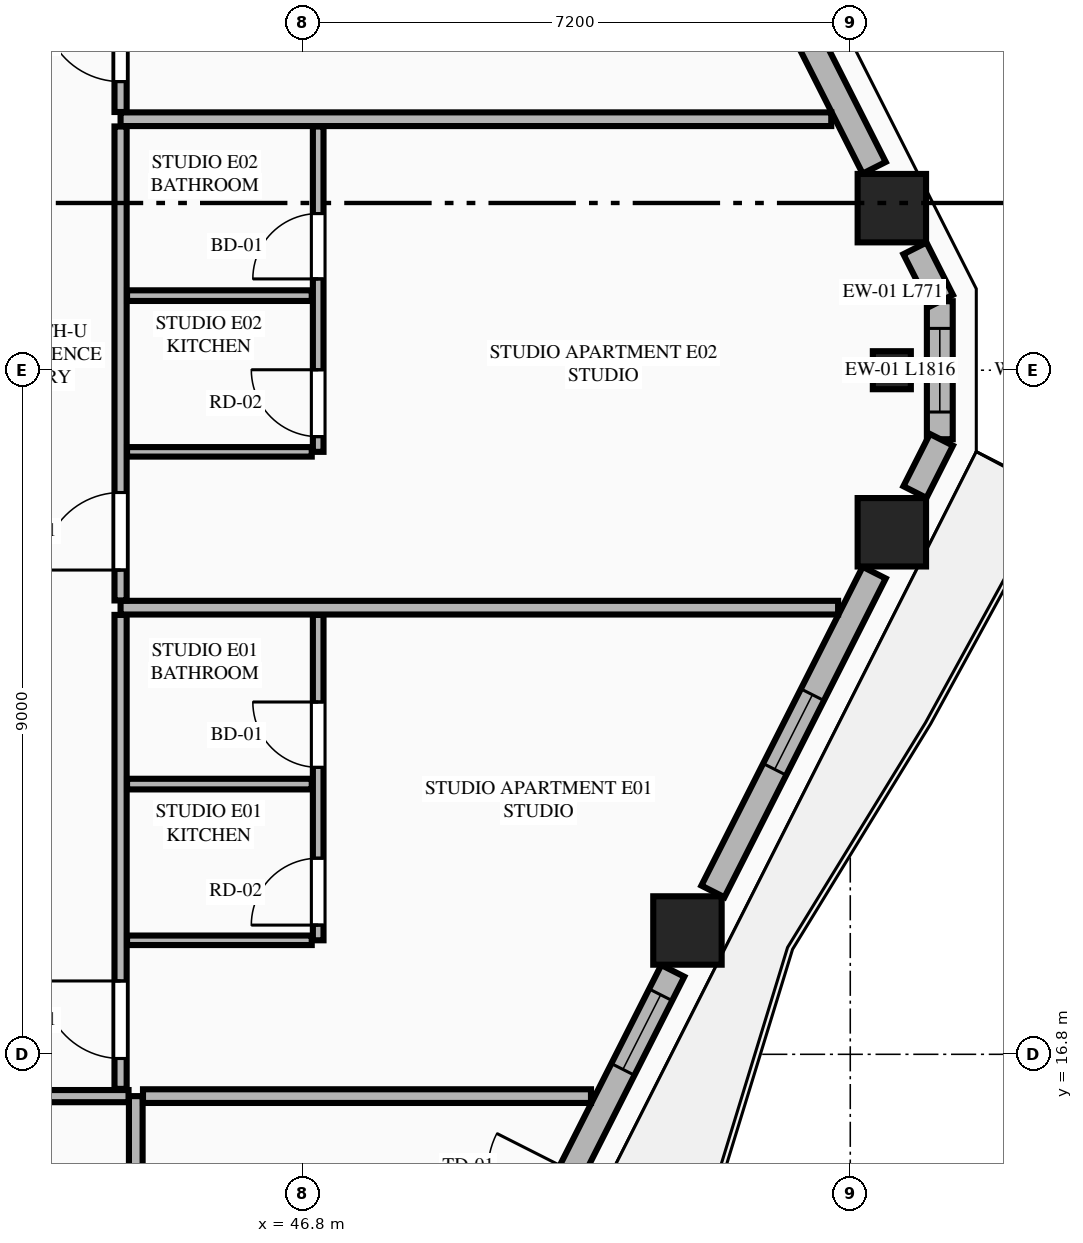
"""IFC4 building model, lengths in metres.
Left out: names, types, materials, properties, quantities, classifications, styles, units other than length and angle.
Written with IfcOpenShell. Run it as: python <this file> out.ifc"""

import sys

from ifc_helpers import new_model, si_unit, direction, frame, frame_2d, origin, origin_2d, place, context, subcontext, project, spatial, rectangle, extrude, element, fill, save


model = new_model("IFC4")
c1 = context("Model", 3, precision=1e-05, world=origin(), true_north=direction((0.0, 1.0)))
c2 = subcontext(c1, "Body", "Model", "MODEL_VIEW")
j1 = project(units=[si_unit("LENGTHUNIT", "METRE"), si_unit("PLANEANGLEUNIT", "RADIAN")], contexts=[c1])
p1 = place(None, origin())
s1 = spatial("IfcSite", under=j1, at=p1, CompositionType="ELEMENT")
p2 = place(p1, origin())
s2 = spatial("IfcBuilding", under=s1, at=p2, CompositionType="ELEMENT")
p3 = place(p2, frame((0.0, 0.0, 186.1)))
s3 = spatial("IfcBuildingStorey", under=s2, at=p3, CompositionType="ELEMENT", Elevation=186.1)
for number, where, z_axis, x_axis in (
    (1, (51.858, 18.429, 0.0), (0.0, 0.0, 1.0), (1.0, 0.0, 0.0)),
    (2, (54.547, 23.668, 0.0), (0.0, 0.0, 1.0), (1.0, 0.0, 0.0)),
    (3, (54.547, 27.932, 0.0), (0.0, 0.0, 1.0), (1.0, 0.0, 0.0)),
):
    element("IfcColumn", number, at=place(p3, frame(where, z_axis=z_axis, x_axis=x_axis)), inside=s3, PredefinedType="COLUMN", context=c2, shape_type="SweptSolid", body=[
        extrude(rectangle(XDim=0.9, YDim=0.9, at=origin_2d()), origin(), (0.0, 0.0, 1.0), 3.55),
    ])
p4 = place(p3, frame((54.547, 25.8, 0.0), z_axis=(0.0, 0.0, 1.0), x_axis=(0.0, 1.0, 0.0)))
e4 = element("IfcColumn", 4, at=p4, inside=s3, PredefinedType="PILASTER", context=c2, shape_type="SweptSolid", body=[
    extrude(rectangle(XDim=0.5, YDim=0.35, at=origin_2d()), origin(), (0.0, 0.0, 1.0), 3.55),
])
p5 = place(p3, frame((55.178, 24.892, 0.0), z_axis=(0.0, 0.0, 1.0), x_axis=(0.0, 1.0, 0.0)))
e5 = element("IfcWall", 5, at=p5, inside=s3, PredefinedType="STANDARD", context=c2, shape_type="SweptSolid", body=[
    extrude(rectangle(XDim=1.816, YDim=0.34, at=frame_2d((0.908, 0.0))), origin(), (0.0, 0.0, 1.0), 3.35),
])
p6 = place(p5, frame((0.358, 0.0, 0.75)))
e6 = element("IfcOpeningElement", 6, at=p6, cuts=e5, PredefinedType="OPENING", context=c2, shape_type="SweptSolid", body=[
    extrude(rectangle(XDim=1.1, YDim=2.0, at=frame_2d((0.55, 1.0))), frame((0.0, 0.18, 0.0), z_axis=(0.0, -1.0, 0.0), x_axis=(1.0, 0.0, 0.0)), (0.0, 0.0, 1.0), 0.36),
])
p7 = place(p3, frame((49.448, 13.517, 0.0), z_axis=(0.0, 0.0, 1.0), x_axis=(0.451544279509, 0.892248711763, 0.0)))
e7 = element("IfcWall", 7, at=p7, inside=s3, PredefinedType="STANDARD", context=c2, shape_type="SweptSolid", body=[
    extrude(rectangle(XDim=4.91, YDim=0.34, at=frame_2d((2.455, 0.0))), origin(), (0.0, 0.0, 1.0), 2.883),
])
p8 = place(p7, frame((0.856, 0.0, 0.0)))
e8 = element("IfcOpeningElement", 8, at=p8, cuts=e7, PredefinedType="OPENING", context=c2, shape_type="SweptSolid", body=[
    extrude(rectangle(XDim=1.1, YDim=2.25, at=frame_2d((0.55, 1.125))), frame((0.0, 0.18, 0.0), z_axis=(0.0, -1.0, 0.0), x_axis=(1.0, 0.0, 0.0)), (0.0, 0.0, 1.0), 0.36),
])
p9 = place(p7, frame((3.457, 0.0, 0.75)))
e9 = element("IfcOpeningElement", 9, at=p9, cuts=e7, PredefinedType="OPENING", context=c2, shape_type="SweptSolid", body=[
    extrude(rectangle(XDim=1.1, YDim=1.983, at=frame_2d((0.55, 0.991))), frame((0.0, 0.18, 0.0), z_axis=(0.0, -1.0, 0.0), x_axis=(1.0, 0.0, 0.0)), (0.0, 0.0, 1.0), 0.36),
])
p10 = place(p3, frame((52.193, 18.943, 0.0), z_axis=(0.0, 0.0, 1.0), x_axis=(0.451447222193, 0.892297823361, 0.0)))
e10 = element("IfcWall", 10, at=p10, inside=s3, PredefinedType="STANDARD", context=c2, shape_type="SweptSolid", body=[
    extrude(rectangle(XDim=4.7, YDim=0.34, at=frame_2d((2.35, 0.0))), origin(), (0.0, 0.0, 1.0), 2.883),
])
p11 = place(p10, frame((1.8, 0.0, 0.75)))
e11 = element("IfcOpeningElement", 11, at=p11, cuts=e10, PredefinedType="OPENING", context=c2, shape_type="SweptSolid", body=[
    extrude(rectangle(XDim=1.1, YDim=1.983, at=frame_2d((0.55, 0.991))), frame((0.0, 0.18, 0.0), z_axis=(0.0, -1.0, 0.0), x_axis=(1.0, 0.0, 0.0)), (0.0, 0.0, 1.0), 0.36),
])
for number, where, z_axis, x_axis in (
    (12, (54.851, 24.197, 0.0), (0.0, 0.0, 1.0), (0.451, 0.892, 0.0)),
    (13, (55.199, 26.715, 0.0), (0.0, 0.0, 1.0), (-0.451, 0.892, 0.0)),
):
    element("IfcWall", number, at=place(p3, frame(where, z_axis=z_axis, x_axis=x_axis)), inside=s3, PredefinedType="STANDARD", context=c2, shape_type="SweptSolid", body=[
        extrude(rectangle(XDim=0.771, YDim=0.34, at=frame_2d((0.385, 0.0))), origin(), (0.0, 0.0, 1.0), 3.35),
    ])
p12 = place(p3, frame((54.315, 28.463, 0.0), z_axis=(0.0, 0.0, 1.0), x_axis=(-0.451426298588, 0.892308409096, 0.0)))
e14 = element("IfcWall", 14, at=p12, inside=s3, PredefinedType="STANDARD", context=c2, shape_type="SweptSolid", body=[
    extrude(rectangle(XDim=4.7, YDim=0.34, at=frame_2d((2.35, 0.0))), origin(), (0.0, 0.0, 1.0), 2.883),
])
p13 = place(p12, frame((1.8, 0.0, 0.75)))
e15 = element("IfcOpeningElement", 15, at=p13, cuts=e14, PredefinedType="OPENING", context=c2, shape_type="SweptSolid", body=[
    extrude(rectangle(XDim=1.1, YDim=1.983, at=frame_2d((0.55, 0.991))), frame((0.0, 0.18, 0.0), z_axis=(0.0, -1.0, 0.0), x_axis=(1.0, 0.0, 0.0)), (0.0, 0.0, 1.0), 0.36),
])
p14 = place(p3, frame((44.6, 5.968, 0.0), z_axis=(0.0, 0.0, 1.0), x_axis=(0.0, 1.0, 0.0)))
e16 = element("IfcWall", 16, at=p14, inside=s3, PredefinedType="PARTITIONING", context=c2, shape_type="SweptSolid", body=[
    extrude(rectangle(XDim=10.282, YDim=0.18, at=frame_2d((5.141, 0.0))), origin(), (0.0, 0.0, 1.0), 3.35),
])
p15 = place(p3, frame((36.038, 16.25, 0.0), z_axis=(0.0, 0.0, 1.0), x_axis=(1.0, 0.0, 0.0)))
e17 = element("IfcWall", 17, at=p15, inside=s3, PredefinedType="PARTITIONING", context=c2, shape_type="SweptSolid", body=[
    extrude(rectangle(XDim=8.467, YDim=0.16, at=frame_2d((4.233, 0.0))), origin(), (0.0, 0.0, 1.0), 3.35),
])
p16 = place(p15, frame((0.355, 0.0, 0.0)))
e18 = element("IfcOpeningElement", 18, at=p16, cuts=e17, PredefinedType="OPENING", context=c2, shape_type="SweptSolid", body=[
    extrude(rectangle(XDim=1.02, YDim=2.25, at=frame_2d((0.51, 1.125))), frame((0.0, 0.09, 0.0), z_axis=(0.0, -1.0, 0.0), x_axis=(1.0, 0.0, 0.0)), (0.0, 0.0, 1.0), 0.18),
])
p17 = place(p3, frame((44.695, 16.25, 0.0), z_axis=(0.0, 0.0, 1.0), x_axis=(1.0, 0.0, 0.0)))
e19 = element("IfcWall", 19, at=p17, inside=s3, PredefinedType="PARTITIONING", context=c2, shape_type="SweptSolid", body=[
    extrude(rectangle(XDim=5.894, YDim=0.18, at=frame_2d((2.947, 0.0))), origin(), (0.0, 0.0, 1.0), 3.35),
])
p18 = place(p3, frame((44.4, 16.345, 0.0), z_axis=(0.0, 0.0, 1.0), x_axis=(0.0, 1.0, 0.0)))
e20 = element("IfcWall", 20, at=p18, inside=s3, PredefinedType="PARTITIONING", context=c2, shape_type="SweptSolid", body=[
    extrude(rectangle(XDim=6.236, YDim=0.16, at=frame_2d((3.118, 0.0))), origin(), (0.0, 0.0, 1.0), 3.35),
])
p19 = place(p18, frame((0.4, 0.0, 0.0)))
e21 = element("IfcOpeningElement", 21, at=p19, cuts=e20, PredefinedType="OPENING", context=c2, shape_type="SweptSolid", body=[
    extrude(rectangle(XDim=1.02, YDim=2.25, at=frame_2d((0.51, 1.125))), frame((0.0, 0.09, 0.0), z_axis=(0.0, -1.0, 0.0), x_axis=(1.0, 0.0, 0.0)), (0.0, 0.0, 1.0), 0.18),
])
p20 = place(p3, frame((44.485, 18.3, 0.0), z_axis=(0.0, 0.0, 1.0), x_axis=(1.0, 0.0, 0.0)))
e22 = element("IfcWall", 22, at=p20, inside=s3, PredefinedType="PARTITIONING", context=c2, shape_type="SweptSolid", body=[
    extrude(rectangle(XDim=2.43, YDim=0.125, at=frame_2d((1.215, 0.0))), origin(), (0.0, 0.0, 1.0), 2.807),
])
p21 = place(p3, frame((47.0, 18.3, 0.0), z_axis=(0.0, 0.0, 1.0), x_axis=(0.0, 1.0, 0.0)))
e23 = element("IfcWall", 23, at=p21, inside=s3, PredefinedType="PLUMBINGWALL", context=c2, shape_type="SweptSolid", body=[
    extrude(rectangle(XDim=4.281, YDim=0.14, at=frame_2d((2.141, 0.0))), origin(), (0.0, 0.0, 1.0), 3.35),
])
p22 = place(p21, frame((2.275, 0.0, 0.0)))
e24 = element("IfcOpeningElement", 24, at=p22, cuts=e23, PredefinedType="OPENING", context=c2, shape_type="SweptSolid", body=[
    extrude(rectangle(XDim=0.86, YDim=2.1, at=frame_2d((0.43, 1.05))), frame((0.0, 0.08, 0.0), z_axis=(0.0, -1.0, 0.0), x_axis=(1.0, 0.0, 0.0)), (0.0, 0.0, 1.0), 0.16),
])
p23 = place(p21, frame((0.2, 0.0, 0.0)))
e25 = element("IfcOpeningElement", 25, at=p23, cuts=e23, PredefinedType="OPENING", context=c2, shape_type="SweptSolid", body=[
    extrude(rectangle(XDim=0.88, YDim=2.15, at=frame_2d((0.44, 1.075))), frame((0.0, 0.08, 0.0), z_axis=(0.0, -1.0, 0.0), x_axis=(1.0, 0.0, 0.0)), (0.0, 0.0, 1.0), 0.16),
])
p24 = place(p3, frame((44.485, 20.355, 0.0), z_axis=(0.0, 0.0, 1.0), x_axis=(1.0, 0.0, 0.0)))
e26 = element("IfcWall", 26, at=p24, inside=s3, PredefinedType="PLUMBINGWALL", context=c2, shape_type="SweptSolid", body=[
    extrude(rectangle(XDim=2.43, YDim=0.14, at=frame_2d((1.215, 0.0))), origin(), (0.0, 0.0, 1.0), 3.35),
])
p25 = place(p3, frame((44.4, 22.676, 0.0), z_axis=(0.0, 0.0, 1.0), x_axis=(1.0, 0.0, 0.0)))
e27 = element("IfcWall", 27, at=p25, inside=s3, PredefinedType="PARTITIONING", context=c2, shape_type="SweptSolid", body=[
    extrude(rectangle(XDim=9.44, YDim=0.18, at=frame_2d((4.72, 0.0))), origin(), (0.0, 0.0, 1.0), 3.35),
])
p26 = place(p3, frame((44.4, 22.771, 0.0), z_axis=(0.0, 0.0, 1.0), x_axis=(0.0, 1.0, 0.0)))
e28 = element("IfcWall", 28, at=p26, inside=s3, PredefinedType="PARTITIONING", context=c2, shape_type="SweptSolid", body=[
    extrude(rectangle(XDim=6.236, YDim=0.16, at=frame_2d((3.118, 0.0))), origin(), (0.0, 0.0, 1.0), 3.35),
])
p27 = place(p26, frame((0.4, 0.0, 0.0)))
e29 = element("IfcOpeningElement", 29, at=p27, cuts=e28, PredefinedType="OPENING", context=c2, shape_type="SweptSolid", body=[
    extrude(rectangle(XDim=1.02, YDim=2.25, at=frame_2d((0.51, 1.125))), frame((0.0, 0.09, 0.0), z_axis=(0.0, -1.0, 0.0), x_axis=(1.0, 0.0, 0.0)), (0.0, 0.0, 1.0), 0.18),
])
p28 = place(p3, frame((44.485, 24.726, 0.0), z_axis=(0.0, 0.0, 1.0), x_axis=(1.0, 0.0, 0.0)))
e30 = element("IfcWall", 30, at=p28, inside=s3, PredefinedType="PARTITIONING", context=c2, shape_type="SweptSolid", body=[
    extrude(rectangle(XDim=2.43, YDim=0.125, at=frame_2d((1.215, 0.0))), origin(), (0.0, 0.0, 1.0), 3.35),
])
p29 = place(p3, frame((47.0, 24.726, 0.0), z_axis=(0.0, 0.0, 1.0), x_axis=(0.0, 1.0, 0.0)))
e31 = element("IfcWall", 31, at=p29, inside=s3, PredefinedType="PLUMBINGWALL", context=c2, shape_type="SweptSolid", body=[
    extrude(rectangle(XDim=4.281, YDim=0.14, at=frame_2d((2.141, 0.0))), origin(), (0.0, 0.0, 1.0), 3.35),
])
p30 = place(p29, frame((2.275, 0.0, 0.0)))
e32 = element("IfcOpeningElement", 32, at=p30, cuts=e31, PredefinedType="OPENING", context=c2, shape_type="SweptSolid", body=[
    extrude(rectangle(XDim=0.86, YDim=2.1, at=frame_2d((0.43, 1.05))), frame((0.0, 0.08, 0.0), z_axis=(0.0, -1.0, 0.0), x_axis=(1.0, 0.0, 0.0)), (0.0, 0.0, 1.0), 0.16),
])
p31 = place(p29, frame((0.2, 0.0, 0.0)))
e33 = element("IfcOpeningElement", 33, at=p31, cuts=e31, PredefinedType="OPENING", context=c2, shape_type="SweptSolid", body=[
    extrude(rectangle(XDim=0.88, YDim=2.15, at=frame_2d((0.44, 1.075))), frame((0.0, 0.08, 0.0), z_axis=(0.0, -1.0, 0.0), x_axis=(1.0, 0.0, 0.0)), (0.0, 0.0, 1.0), 0.16),
])
p32 = place(p3, frame((44.485, 26.781, 0.0), z_axis=(0.0, 0.0, 1.0), x_axis=(1.0, 0.0, 0.0)))
e34 = element("IfcWall", 34, at=p32, inside=s3, PredefinedType="PLUMBINGWALL", context=c2, shape_type="SweptSolid", body=[
    extrude(rectangle(XDim=2.43, YDim=0.14, at=frame_2d((1.215, 0.0))), origin(), (0.0, 0.0, 1.0), 3.35),
])
p33 = place(p3, frame((44.4, 29.102, 0.0), z_axis=(0.0, 0.0, 1.0), x_axis=(1.0, 0.0, 0.0)))
e35 = element("IfcWall", 35, at=p33, inside=s3, PredefinedType="PARTITIONING", context=c2, shape_type="SweptSolid", body=[
    extrude(rectangle(XDim=9.35, YDim=0.18, at=frame_2d((4.675, 0.0))), origin(), (0.0, 0.0, 1.0), 3.35),
])
p34 = place(p3, frame((44.4, 29.197, 0.0), z_axis=(0.0, 0.0, 1.0), x_axis=(0.0, 1.0, 0.0)))
e36 = element("IfcWall", 36, at=p34, inside=s3, PredefinedType="PARTITIONING", context=c2, shape_type="SweptSolid", body=[
    extrude(rectangle(XDim=5.858, YDim=0.16, at=frame_2d((2.929, 0.0))), origin(), (0.0, 0.0, 1.0), 3.35),
])
p35 = place(p34, frame((0.4, 0.0, 0.0)))
e37 = element("IfcOpeningElement", 37, at=p35, cuts=e36, PredefinedType="OPENING", context=c2, shape_type="SweptSolid", body=[
    extrude(rectangle(XDim=1.02, YDim=2.25, at=frame_2d((0.51, 1.125))), frame((0.0, 0.09, 0.0), z_axis=(0.0, -1.0, 0.0), x_axis=(1.0, 0.0, 0.0)), (0.0, 0.0, 1.0), 0.18),
])
p36 = place(p11, origin())
e38 = element("IfcWindow", 38, at=p36, inside=s3, PartitioningType="SINGLE_PANEL", PredefinedType="WINDOW", context=c2, shape_type="SweptSolid", body=[
    extrude(rectangle(XDim=1.1, YDim=1.983, at=frame_2d((0.55, 0.991))), frame((0.0, 0.03, 0.0), z_axis=(0.0, -1.0, 0.0), x_axis=(1.0, 0.0, 0.0)), (0.0, 0.0, 1.0), 0.06),
])
fill(e11, e38)
p37 = place(p22, origin())
e39 = element("IfcDoor", 39, at=p37, inside=s3, OperationType="SINGLE_SWING_RIGHT", PredefinedType="DOOR", context=c2, shape_type="SweptSolid", body=[
    extrude(rectangle(XDim=0.86, YDim=2.1, at=frame_2d((0.43, 1.05))), frame((0.0, 0.025, 0.0), z_axis=(0.0, -1.0, 0.0), x_axis=(1.0, 0.0, 0.0)), (0.0, 0.0, 1.0), 0.05),
])
fill(e24, e39)
p38 = place(p19, origin())
e40 = element("IfcDoor", 40, at=p38, inside=s3, OperationType="SINGLE_SWING_RIGHT", PredefinedType="DOOR", context=c2, shape_type="SweptSolid", body=[
    extrude(rectangle(XDim=1.02, YDim=2.25, at=frame_2d((0.51, 1.125))), frame((0.0, 0.025, 0.0), z_axis=(0.0, -1.0, 0.0), x_axis=(1.0, 0.0, 0.0)), (0.0, 0.0, 1.0), 0.05),
])
fill(e21, e40)
p39 = place(p23, origin())
e41 = element("IfcDoor", 41, at=p39, inside=s3, OperationType="SINGLE_SWING_LEFT", PredefinedType="DOOR", context=c2, shape_type="SweptSolid", body=[
    extrude(rectangle(XDim=0.88, YDim=2.15, at=frame_2d((0.44, 1.075))), frame((0.0, 0.025, 0.0), z_axis=(0.0, -1.0, 0.0), x_axis=(1.0, 0.0, 0.0)), (0.0, 0.0, 1.0), 0.05),
])
fill(e25, e41)
p40 = place(p30, origin())
e42 = element("IfcDoor", 42, at=p40, inside=s3, OperationType="SINGLE_SWING_LEFT", PredefinedType="DOOR", context=c2, shape_type="SweptSolid", body=[
    extrude(rectangle(XDim=0.86, YDim=2.1, at=frame_2d((0.43, 1.05))), frame((0.0, 0.025, 0.0), z_axis=(0.0, -1.0, 0.0), x_axis=(1.0, 0.0, 0.0)), (0.0, 0.0, 1.0), 0.05),
])
fill(e32, e42)
p41 = place(p27, origin())
e43 = element("IfcDoor", 43, at=p41, inside=s3, OperationType="SINGLE_SWING_LEFT", PredefinedType="DOOR", context=c2, shape_type="SweptSolid", body=[
    extrude(rectangle(XDim=1.02, YDim=2.25, at=frame_2d((0.51, 1.125))), frame((0.0, 0.025, 0.0), z_axis=(0.0, -1.0, 0.0), x_axis=(1.0, 0.0, 0.0)), (0.0, 0.0, 1.0), 0.05),
])
fill(e29, e43)
p42 = place(p31, origin())
e44 = element("IfcDoor", 44, at=p42, inside=s3, OperationType="SINGLE_SWING_RIGHT", PredefinedType="DOOR", context=c2, shape_type="SweptSolid", body=[
    extrude(rectangle(XDim=0.88, YDim=2.15, at=frame_2d((0.44, 1.075))), frame((0.0, 0.025, 0.0), z_axis=(0.0, -1.0, 0.0), x_axis=(1.0, 0.0, 0.0)), (0.0, 0.0, 1.0), 0.05),
])
fill(e33, e44)
p43 = place(p35, origin())
e45 = element("IfcDoor", 45, at=p43, inside=s3, OperationType="SINGLE_SWING_RIGHT", PredefinedType="DOOR", context=c2, shape_type="SweptSolid", body=[
    extrude(rectangle(XDim=1.02, YDim=2.25, at=frame_2d((0.51, 1.125))), frame((0.0, 0.025, 0.0), z_axis=(0.0, -1.0, 0.0), x_axis=(1.0, 0.0, 0.0)), (0.0, 0.0, 1.0), 0.05),
])
fill(e37, e45)
p44 = place(p9, origin())
e46 = element("IfcWindow", 46, at=p44, inside=s3, PartitioningType="SINGLE_PANEL", PredefinedType="WINDOW", context=c2, shape_type="SweptSolid", body=[
    extrude(rectangle(XDim=1.1, YDim=1.983, at=frame_2d((0.55, 0.991))), frame((0.0, 0.03, 0.0), z_axis=(0.0, -1.0, 0.0), x_axis=(1.0, 0.0, 0.0)), (0.0, 0.0, 1.0), 0.06),
])
fill(e9, e46)
p45 = place(p6, origin())
e47 = element("IfcWindow", 47, at=p45, inside=s3, PartitioningType="SINGLE_PANEL", PredefinedType="WINDOW", context=c2, shape_type="SweptSolid", body=[
    extrude(rectangle(XDim=1.1, YDim=2.0, at=frame_2d((0.55, 1.0))), frame((0.0, 0.03, 0.0), z_axis=(0.0, -1.0, 0.0), x_axis=(1.0, 0.0, 0.0)), (0.0, 0.0, 1.0), 0.06),
])
fill(e6, e47)
save(model, sys.argv[1])
